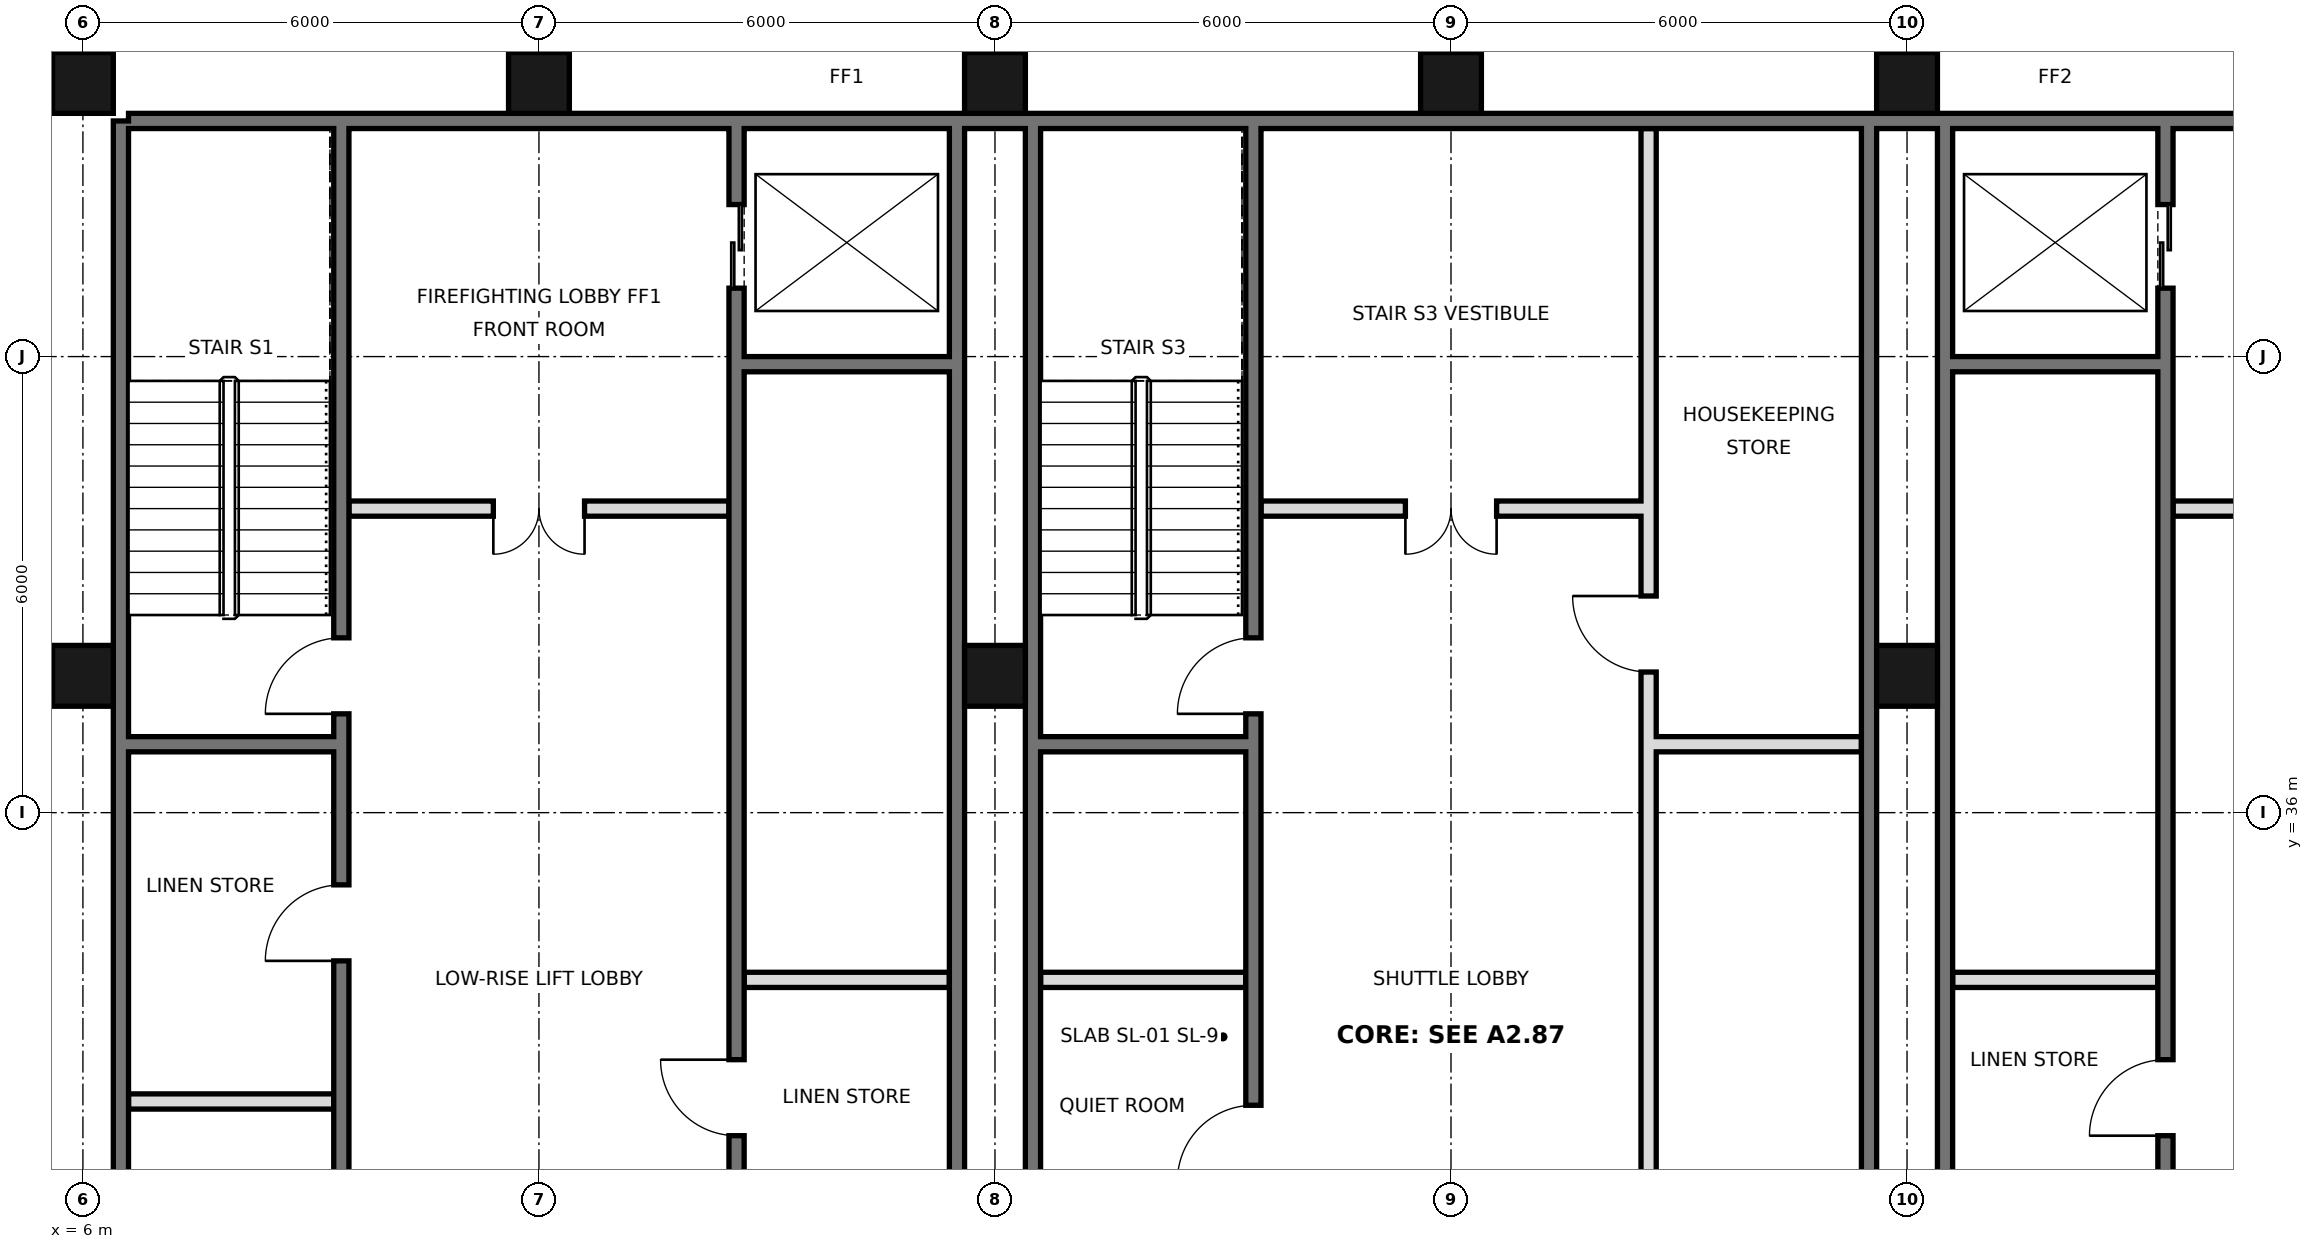
"""IFC4 building model, lengths in metres.
Left out: names, types, materials, properties, quantities, classifications, styles, units other than length and angle.
Written with IfcOpenShell. Run it as: python <this file> out.ifc"""

import sys

from ifc_helpers import new_model, si_unit, direction, frame, frame_2d, origin, origin_2d, place, context, subcontext, project, spatial, rectangle, hollow_rectangle, extrude, element, fill, save


model = new_model("IFC4")
c1 = context("Model", 3, precision=1e-05, world=origin(), true_north=direction((0.0, 1.0)))
c2 = subcontext(c1, "Body", "Model", "MODEL_VIEW")
j1 = project(units=[si_unit("LENGTHUNIT", "METRE"), si_unit("PLANEANGLEUNIT", "RADIAN")], contexts=[c1])
p1 = place(None, origin())
s1 = spatial("IfcSite", under=j1, at=p1, CompositionType="ELEMENT")
p2 = place(p1, origin())
s2 = spatial("IfcBuilding", under=s1, at=p2, CompositionType="ELEMENT")
p3 = place(p2, frame((0.0, 0.0, 349.8)))
s3 = spatial("IfcBuildingStorey", under=s2, at=p3, CompositionType="ELEMENT", Elevation=349.8)
for number, where, z_axis, x_axis in (
    (1, (6.0, 37.8, 0.0), (0.0, 0.0, 1.0), (1.0, 0.0, 0.0)),
    (2, (6.0, 45.6, 0.0), (0.0, 0.0, 1.0), (1.0, 0.0, 0.0)),
    (3, (12.0, 45.6, 0.0), (0.0, 0.0, 1.0), (1.0, 0.0, 0.0)),
    (4, (18.0, 37.8, 0.0), (0.0, 0.0, 1.0), (1.0, 0.0, 0.0)),
    (5, (18.0, 45.6, 0.0), (0.0, 0.0, 1.0), (1.0, 0.0, 0.0)),
    (6, (24.0, 45.6, 0.0), (0.0, 0.0, 1.0), (1.0, 0.0, 0.0)),
    (7, (30.0, 37.8, 0.0), (0.0, 0.0, 1.0), (1.0, 0.0, 0.0)),
    (8, (30.0, 45.6, 0.0), (0.0, 0.0, 1.0), (1.0, 0.0, 0.0)),
):
    element("IfcColumn", number, at=place(p3, frame(where, z_axis=z_axis, x_axis=x_axis)), inside=s3, PredefinedType="COLUMN", context=c2, shape_type="SweptSolid", body=[
        extrude(hollow_rectangle(XDim=0.8, YDim=0.8, WallThickness=0.025, at=origin_2d()), origin(), (0.0, 0.0, 1.0), 4.0),
    ])
p4 = place(p3, frame((6.5, 21.6, 0.0), z_axis=(0.0, 0.0, 1.0), x_axis=(0.0, 1.0, 0.0)))
e9 = element("IfcWall", 9, at=p4, inside=s3, PredefinedType="SOLIDWALL", context=c2, shape_type="SweptSolid", body=[
    extrude(rectangle(XDim=23.5, YDim=0.2, at=frame_2d((11.75, 0.0))), origin(), (0.0, 0.0, 1.0), 3.75),
])
p5 = place(p3, frame((6.6, 45.1, 0.0), z_axis=(0.0, 0.0, 1.0), x_axis=(1.0, 0.0, 0.0)))
e10 = element("IfcWall", 10, at=p5, inside=s3, PredefinedType="SOLIDWALL", context=c2, shape_type="SweptSolid", body=[
    extrude(rectangle(XDim=34.8, YDim=0.2, at=frame_2d((17.4, 0.0))), origin(), (0.0, 0.0, 1.0), 3.75),
])
for number, where, z_axis, x_axis in (
    (11, (17.5, 27.6, 0.0), (0.0, 0.0, 1.0), (0.0, 1.0, 0.0)),
    (12, (18.5, 27.6, 0.0), (0.0, 0.0, 1.0), (0.0, 1.0, 0.0)),
    (13, (29.5, 27.6, 0.0), (0.0, 0.0, 1.0), (0.0, 1.0, 0.0)),
    (14, (30.5, 27.6, 0.0), (0.0, 0.0, 1.0), (0.0, 1.0, 0.0)),
):
    element("IfcWall", number, at=place(p3, frame(where, z_axis=z_axis, x_axis=x_axis)), inside=s3, PredefinedType="SOLIDWALL", context=c2, shape_type="SweptSolid", body=[
        extrude(rectangle(XDim=17.5, YDim=0.2, at=frame_2d((8.75, 0.0))), origin(), (0.0, 0.0, 1.0), 3.75),
    ])
p6 = place(p3, frame((14.6, 27.5, 0.0), z_axis=(0.0, 0.0, 1.0), x_axis=(0.0, 1.0, 0.0)))
e15 = element("IfcWall", 15, at=p6, inside=s3, PredefinedType="SOLIDWALL", context=c2, shape_type="SweptSolid", body=[
    extrude(rectangle(XDim=17.5, YDim=0.2, at=frame_2d((8.75, 0.0))), origin(), (0.0, 0.0, 1.0), 3.75),
])
p7 = place(p6, frame((15.4, 0.0, 0.0)))
e16 = element("IfcOpeningElement", 16, at=p7, cuts=e15, PredefinedType="OPENING", context=c2, shape_type="SweptSolid", body=[
    extrude(rectangle(XDim=1.1, YDim=2.1, at=frame_2d((0.55, 1.05))), frame((0.0, 0.11, 0.0), z_axis=(0.0, -1.0, 0.0), x_axis=(1.0, 0.0, 0.0)), (0.0, 0.0, 1.0), 0.22),
])
p8 = place(p6, frame((1.15, 0.0, 0.0)))
e17 = element("IfcOpeningElement", 17, at=p8, cuts=e15, PredefinedType="OPENING", context=c2, shape_type="SweptSolid", body=[
    extrude(rectangle(XDim=1.0, YDim=2.1, at=frame_2d((0.5, 1.05))), frame((0.0, 0.11, 0.0), z_axis=(0.0, -1.0, 0.0), x_axis=(1.0, 0.0, 0.0)), (0.0, 0.0, 1.0), 0.22),
])
p9 = place(p6, frame((4.25, 0.0, 0.0)))
e18 = element("IfcOpeningElement", 18, at=p9, cuts=e15, PredefinedType="OPENING", context=c2, shape_type="SweptSolid", body=[
    extrude(rectangle(XDim=1.0, YDim=2.1, at=frame_2d((0.5, 1.05))), frame((0.0, 0.11, 0.0), z_axis=(0.0, -1.0, 0.0), x_axis=(1.0, 0.0, 0.0)), (0.0, 0.0, 1.0), 0.22),
])
p10 = place(p3, frame((21.4, 27.5, 0.0), z_axis=(0.0, 0.0, 1.0), x_axis=(0.0, 1.0, 0.0)))
e19 = element("IfcWall", 19, at=p10, inside=s3, PredefinedType="SOLIDWALL", context=c2, shape_type="SweptSolid", body=[
    extrude(rectangle(XDim=17.5, YDim=0.2, at=frame_2d((8.75, 0.0))), origin(), (0.0, 0.0, 1.0), 3.75),
])
p11 = place(p10, frame((0.55, 0.0, 0.0)))
e20 = element("IfcOpeningElement", 20, at=p11, cuts=e19, PredefinedType="OPENING", context=c2, shape_type="SweptSolid", body=[
    extrude(rectangle(XDim=1.0, YDim=2.1, at=frame_2d((0.5, 1.05))), frame((0.0, 0.11, 0.0), z_axis=(0.0, -1.0, 0.0), x_axis=(1.0, 0.0, 0.0)), (0.0, 0.0, 1.0), 0.22),
])
p12 = place(p10, frame((3.65, 0.0, 0.0)))
e21 = element("IfcOpeningElement", 21, at=p12, cuts=e19, PredefinedType="OPENING", context=c2, shape_type="SweptSolid", body=[
    extrude(rectangle(XDim=1.0, YDim=2.1, at=frame_2d((0.5, 1.05))), frame((0.0, 0.11, 0.0), z_axis=(0.0, -1.0, 0.0), x_axis=(1.0, 0.0, 0.0)), (0.0, 0.0, 1.0), 0.22),
])
p13 = place(p10, frame((9.8, 0.0, 0.0)))
e22 = element("IfcOpeningElement", 22, at=p13, cuts=e19, PredefinedType="OPENING", context=c2, shape_type="SweptSolid", body=[
    extrude(rectangle(XDim=1.0, YDim=2.1, at=frame_2d((0.5, 1.05))), frame((0.0, 0.11, 0.0), z_axis=(0.0, -1.0, 0.0), x_axis=(1.0, 0.0, 0.0)), (0.0, 0.0, 1.0), 0.22),
])
p14 = place(p3, frame((26.6, 27.6, 0.0), z_axis=(0.0, 0.0, 1.0), x_axis=(0.0, 1.0, 0.0)))
e23 = element("IfcWall", 23, at=p14, inside=s3, PredefinedType="PARTITIONING", context=c2, shape_type="SweptSolid", body=[
    extrude(rectangle(XDim=17.4, YDim=0.2, at=frame_2d((8.7, 0.0))), origin(), (0.0, 0.0, 1.0), 3.75),
])
p15 = place(p14, frame((10.25, 0.0, 0.0)))
e24 = element("IfcOpeningElement", 24, at=p15, cuts=e23, PredefinedType="OPENING", context=c2, shape_type="SweptSolid", body=[
    extrude(rectangle(XDim=1.0, YDim=2.1, at=frame_2d((0.5, 1.05))), frame((0.0, 0.11, 0.0), z_axis=(0.0, -1.0, 0.0), x_axis=(1.0, 0.0, 0.0)), (0.0, 0.0, 1.0), 0.22),
])
p16 = place(p3, frame((33.4, 27.5, 0.0), z_axis=(0.0, 0.0, 1.0), x_axis=(0.0, 1.0, 0.0)))
e25 = element("IfcWall", 25, at=p16, inside=s3, PredefinedType="SOLIDWALL", context=c2, shape_type="SweptSolid", body=[
    extrude(rectangle(XDim=17.5, YDim=0.2, at=frame_2d((8.75, 0.0))), origin(), (0.0, 0.0, 1.0), 3.75),
])
p17 = place(p16, frame((15.4, 0.0, 0.0)))
e26 = element("IfcOpeningElement", 26, at=p17, cuts=e25, PredefinedType="OPENING", context=c2, shape_type="SweptSolid", body=[
    extrude(rectangle(XDim=1.1, YDim=2.1, at=frame_2d((0.55, 1.05))), frame((0.0, 0.11, 0.0), z_axis=(0.0, -1.0, 0.0), x_axis=(1.0, 0.0, 0.0)), (0.0, 0.0, 1.0), 0.22),
])
p18 = place(p16, frame((1.15, 0.0, 0.0)))
e27 = element("IfcOpeningElement", 27, at=p18, cuts=e25, PredefinedType="OPENING", context=c2, shape_type="SweptSolid", body=[
    extrude(rectangle(XDim=1.0, YDim=2.1, at=frame_2d((0.5, 1.05))), frame((0.0, 0.11, 0.0), z_axis=(0.0, -1.0, 0.0), x_axis=(1.0, 0.0, 0.0)), (0.0, 0.0, 1.0), 0.22),
])
p19 = place(p16, frame((4.25, 0.0, 0.0)))
e28 = element("IfcOpeningElement", 28, at=p19, cuts=e25, PredefinedType="OPENING", context=c2, shape_type="SweptSolid", body=[
    extrude(rectangle(XDim=1.0, YDim=2.1, at=frame_2d((0.5, 1.05))), frame((0.0, 0.11, 0.0), z_axis=(0.0, -1.0, 0.0), x_axis=(1.0, 0.0, 0.0)), (0.0, 0.0, 1.0), 0.22),
])
p20 = place(p3, frame((9.4, 21.5, 0.0), z_axis=(0.0, 0.0, 1.0), x_axis=(0.0, 1.0, 0.0)))
e29 = element("IfcWall", 29, at=p20, inside=s3, PredefinedType="SOLIDWALL", context=c2, shape_type="SweptSolid", body=[
    extrude(rectangle(XDim=23.5, YDim=0.2, at=frame_2d((11.75, 0.0))), origin(), (0.0, 0.0, 1.0), 3.75),
])
p21 = place(p20, frame((7.9, 0.0, 0.0)))
e30 = element("IfcOpeningElement", 30, at=p21, cuts=e29, PredefinedType="OPENING", context=c2, shape_type="SweptSolid", body=[
    extrude(rectangle(XDim=1.0, YDim=2.1, at=frame_2d((0.5, 1.05))), frame((0.0, 0.11, 0.0), z_axis=(0.0, -1.0, 0.0), x_axis=(1.0, 0.0, 0.0)), (0.0, 0.0, 1.0), 0.22),
])
p22 = place(p20, frame((12.55, 0.0, 0.0)))
e31 = element("IfcOpeningElement", 31, at=p22, cuts=e29, PredefinedType="OPENING", context=c2, shape_type="SweptSolid", body=[
    extrude(rectangle(XDim=1.0, YDim=2.1, at=frame_2d((0.5, 1.05))), frame((0.0, 0.11, 0.0), z_axis=(0.0, -1.0, 0.0), x_axis=(1.0, 0.0, 0.0)), (0.0, 0.0, 1.0), 0.22),
])
p23 = place(p20, frame((15.8, 0.0, 0.0)))
e32 = element("IfcOpeningElement", 32, at=p23, cuts=e29, PredefinedType="OPENING", context=c2, shape_type="SweptSolid", body=[
    extrude(rectangle(XDim=1.0, YDim=2.1, at=frame_2d((0.5, 1.05))), frame((0.0, 0.11, 0.0), z_axis=(0.0, -1.0, 0.0), x_axis=(1.0, 0.0, 0.0)), (0.0, 0.0, 1.0), 0.22),
])
p24 = place(p20, frame((0.275, 0.0, 0.0)))
e33 = element("IfcOpeningElement", 33, at=p24, cuts=e29, PredefinedType="OPENING", context=c2, shape_type="SweptSolid", body=[
    extrude(rectangle(XDim=0.9, YDim=2.1, at=frame_2d((0.45, 1.05))), frame((0.0, 0.11, 0.0), z_axis=(0.0, -1.0, 0.0), x_axis=(1.0, 0.0, 0.0)), (0.0, 0.0, 1.0), 0.22),
])
for number, where, z_axis, x_axis in (
    (34, (6.6, 32.2, 0.0), (0.0, 0.0, 1.0), (1.0, 0.0, 0.0)),
    (35, (14.7, 33.8, 0.0), (0.0, 0.0, 1.0), (1.0, 0.0, 0.0)),
    (36, (18.6, 33.8, 0.0), (0.0, 0.0, 1.0), (1.0, 0.0, 0.0)),
    (37, (30.6, 33.8, 0.0), (0.0, 0.0, 1.0), (1.0, 0.0, 0.0)),
):
    element("IfcWall", number, at=place(p3, frame(where, z_axis=z_axis, x_axis=x_axis)), inside=s3, PredefinedType="PARTITIONING", context=c2, shape_type="SweptSolid", body=[
        extrude(rectangle(XDim=2.7, YDim=0.2, at=frame_2d((1.35, 0.0))), origin(), (0.0, 0.0, 1.0), 3.75),
    ])
p25 = place(p3, frame((18.6, 36.9, 0.0), z_axis=(0.0, 0.0, 1.0), x_axis=(1.0, 0.0, 0.0)))
e38 = element("IfcWall", 38, at=p25, inside=s3, PredefinedType="SOLIDWALL", context=c2, shape_type="SweptSolid", body=[
    extrude(rectangle(XDim=2.7, YDim=0.2, at=frame_2d((1.35, 0.0))), origin(), (0.0, 0.0, 1.0), 3.75),
])
p26 = place(p3, frame((26.7, 36.9, 0.0), z_axis=(0.0, 0.0, 1.0), x_axis=(1.0, 0.0, 0.0)))
e39 = element("IfcWall", 39, at=p26, inside=s3, PredefinedType="PARTITIONING", context=c2, shape_type="SweptSolid", body=[
    extrude(rectangle(XDim=2.7, YDim=0.2, at=frame_2d((1.35, 0.0))), origin(), (0.0, 0.0, 1.0), 3.75),
])
p27 = place(p3, frame((6.6, 36.9, 0.0), z_axis=(0.0, 0.0, 1.0), x_axis=(1.0, 0.0, 0.0)))
e40 = element("IfcWall", 40, at=p27, inside=s3, PredefinedType="SOLIDWALL", context=c2, shape_type="SweptSolid", body=[
    extrude(rectangle(XDim=2.7, YDim=0.2, at=frame_2d((1.35, 0.0))), origin(), (0.0, 0.0, 1.0), 3.75),
])
p28 = place(p3, frame((21.5, 40.0, 0.0), z_axis=(0.0, 0.0, 1.0), x_axis=(1.0, 0.0, 0.0)))
e41 = element("IfcWall", 41, at=p28, inside=s3, PredefinedType="PARTITIONING", context=c2, shape_type="SweptSolid", body=[
    extrude(rectangle(XDim=5.0, YDim=0.2, at=frame_2d((2.5, 0.0))), origin(), (0.0, 0.0, 1.0), 3.75),
])
p29 = place(p28, frame((1.9, 0.0, 0.0)))
e42 = element("IfcOpeningElement", 42, at=p29, cuts=e41, PredefinedType="OPENING", context=c2, shape_type="SweptSolid", body=[
    extrude(rectangle(XDim=1.2, YDim=2.1, at=frame_2d((0.6, 1.05))), frame((0.0, 0.11, 0.0), z_axis=(0.0, -1.0, 0.0), x_axis=(1.0, 0.0, 0.0)), (0.0, 0.0, 1.0), 0.22),
])
p30 = place(p3, frame((33.5, 40.0, 0.0), z_axis=(0.0, 0.0, 1.0), x_axis=(1.0, 0.0, 0.0)))
e43 = element("IfcWall", 43, at=p30, inside=s3, PredefinedType="PARTITIONING", context=c2, shape_type="SweptSolid", body=[
    extrude(rectangle(XDim=5.0, YDim=0.2, at=frame_2d((2.5, 0.0))), origin(), (0.0, 0.0, 1.0), 3.75),
])
p31 = place(p30, frame((1.9, 0.0, 0.0)))
e44 = element("IfcOpeningElement", 44, at=p31, cuts=e43, PredefinedType="OPENING", context=c2, shape_type="SweptSolid", body=[
    extrude(rectangle(XDim=1.2, YDim=2.1, at=frame_2d((0.6, 1.05))), frame((0.0, 0.11, 0.0), z_axis=(0.0, -1.0, 0.0), x_axis=(1.0, 0.0, 0.0)), (0.0, 0.0, 1.0), 0.22),
])
p32 = place(p3, frame((9.5, 40.0, 0.0), z_axis=(0.0, 0.0, 1.0), x_axis=(1.0, 0.0, 0.0)))
e45 = element("IfcWall", 45, at=p32, inside=s3, PredefinedType="PARTITIONING", context=c2, shape_type="SweptSolid", body=[
    extrude(rectangle(XDim=5.0, YDim=0.2, at=frame_2d((2.5, 0.0))), origin(), (0.0, 0.0, 1.0), 3.75),
])
p33 = place(p32, frame((1.9, 0.0, 0.0)))
e46 = element("IfcOpeningElement", 46, at=p33, cuts=e45, PredefinedType="OPENING", context=c2, shape_type="SweptSolid", body=[
    extrude(rectangle(XDim=1.2, YDim=2.1, at=frame_2d((0.6, 1.05))), frame((0.0, 0.11, 0.0), z_axis=(0.0, -1.0, 0.0), x_axis=(1.0, 0.0, 0.0)), (0.0, 0.0, 1.0), 0.22),
])
for number, where, z_axis, x_axis in (
    (47, (14.7, 41.9, 0.0), (0.0, 0.0, 1.0), (1.0, 0.0, 0.0)),
    (48, (30.6, 41.9, 0.0), (0.0, 0.0, 1.0), (1.0, 0.0, 0.0)),
):
    element("IfcWall", number, at=place(p3, frame(where, z_axis=z_axis, x_axis=x_axis)), inside=s3, PredefinedType="SOLIDWALL", context=c2, shape_type="SweptSolid", body=[
        extrude(rectangle(XDim=2.7, YDim=0.2, at=frame_2d((1.35, 0.0))), origin(), (0.0, 0.0, 1.0), 3.75),
    ])
p34 = place(p33, frame((1.2, 0.0, 0.0), z_axis=(0.0, 0.0, 1.0), x_axis=(-1.0, 0.0, 0.0)))
e49 = element("IfcDoor", 49, at=p34, inside=s3, OperationType="DOUBLE_DOOR_SINGLE_SWING", PredefinedType="DOOR", context=c2, shape_type="SweptSolid", body=[
    extrude(rectangle(XDim=1.2, YDim=2.1, at=frame_2d((0.6, 1.05))), frame((0.0, 0.025, 0.0), z_axis=(0.0, -1.0, 0.0), x_axis=(1.0, 0.0, 0.0)), (0.0, 0.0, 1.0), 0.05),
])
fill(e46, e49)
p35 = place(p29, frame((1.2, 0.0, 0.0), z_axis=(0.0, 0.0, 1.0), x_axis=(-1.0, 0.0, 0.0)))
e50 = element("IfcDoor", 50, at=p35, inside=s3, OperationType="DOUBLE_DOOR_SINGLE_SWING", PredefinedType="DOOR", context=c2, shape_type="SweptSolid", body=[
    extrude(rectangle(XDim=1.2, YDim=2.1, at=frame_2d((0.6, 1.05))), frame((0.0, 0.025, 0.0), z_axis=(0.0, -1.0, 0.0), x_axis=(1.0, 0.0, 0.0)), (0.0, 0.0, 1.0), 0.05),
])
fill(e42, e50)
p36 = place(p17, origin())
e51 = element("IfcDoor", 51, at=p36, inside=s3, OperationType="DOUBLE_DOOR_SLIDING", PredefinedType="DOOR", context=c2, shape_type="SweptSolid", body=[
    extrude(rectangle(XDim=1.1, YDim=2.1, at=frame_2d((0.55, 1.05))), frame((0.0, 0.025, 0.0), z_axis=(0.0, -1.0, 0.0), x_axis=(1.0, 0.0, 0.0)), (0.0, 0.0, 1.0), 0.05),
])
fill(e26, e51)
p37 = place(p7, origin())
e52 = element("IfcDoor", 52, at=p37, inside=s3, OperationType="DOUBLE_DOOR_SLIDING", PredefinedType="DOOR", context=c2, shape_type="SweptSolid", body=[
    extrude(rectangle(XDim=1.1, YDim=2.1, at=frame_2d((0.55, 1.05))), frame((0.0, 0.025, 0.0), z_axis=(0.0, -1.0, 0.0), x_axis=(1.0, 0.0, 0.0)), (0.0, 0.0, 1.0), 0.05),
])
fill(e16, e52)
p38 = place(p12, origin())
e53 = element("IfcDoor", 53, at=p38, inside=s3, OperationType="SINGLE_SWING_LEFT", PredefinedType="DOOR", context=c2, shape_type="SweptSolid", body=[
    extrude(rectangle(XDim=1.0, YDim=2.1, at=frame_2d((0.5, 1.05))), frame((0.0, 0.025, 0.0), z_axis=(0.0, -1.0, 0.0), x_axis=(1.0, 0.0, 0.0)), (0.0, 0.0, 1.0), 0.05),
])
fill(e21, e53)
p39 = place(p19, origin())
e54 = element("IfcDoor", 54, at=p39, inside=s3, OperationType="SINGLE_SWING_LEFT", PredefinedType="DOOR", context=c2, shape_type="SweptSolid", body=[
    extrude(rectangle(XDim=1.0, YDim=2.1, at=frame_2d((0.5, 1.05))), frame((0.0, 0.025, 0.0), z_axis=(0.0, -1.0, 0.0), x_axis=(1.0, 0.0, 0.0)), (0.0, 0.0, 1.0), 0.05),
])
fill(e28, e54)
p40 = place(p9, frame((1.0, 0.0, 0.0), z_axis=(0.0, 0.0, 1.0), x_axis=(-1.0, 0.0, 0.0)))
e55 = element("IfcDoor", 55, at=p40, inside=s3, OperationType="SINGLE_SWING_LEFT", PredefinedType="DOOR", context=c2, shape_type="SweptSolid", body=[
    extrude(rectangle(XDim=1.0, YDim=2.1, at=frame_2d((0.5, 1.05))), frame((0.0, 0.025, 0.0), z_axis=(0.0, -1.0, 0.0), x_axis=(1.0, 0.0, 0.0)), (0.0, 0.0, 1.0), 0.05),
])
fill(e18, e55)
p41 = place(p22, origin())
e56 = element("IfcDoor", 56, at=p41, inside=s3, OperationType="SINGLE_SWING_LEFT", PredefinedType="DOOR", context=c2, shape_type="SweptSolid", body=[
    extrude(rectangle(XDim=1.0, YDim=2.1, at=frame_2d((0.5, 1.05))), frame((0.0, 0.025, 0.0), z_axis=(0.0, -1.0, 0.0), x_axis=(1.0, 0.0, 0.0)), (0.0, 0.0, 1.0), 0.05),
])
fill(e31, e56)
p42 = place(p23, origin())
e57 = element("IfcDoor", 57, at=p42, inside=s3, OperationType="SINGLE_SWING_LEFT", PredefinedType="DOOR", context=c2, shape_type="SweptSolid", body=[
    extrude(rectangle(XDim=1.0, YDim=2.1, at=frame_2d((0.5, 1.05))), frame((0.0, 0.025, 0.0), z_axis=(0.0, -1.0, 0.0), x_axis=(1.0, 0.0, 0.0)), (0.0, 0.0, 1.0), 0.05),
])
fill(e32, e57)
p43 = place(p13, origin())
e58 = element("IfcDoor", 58, at=p43, inside=s3, OperationType="SINGLE_SWING_LEFT", PredefinedType="DOOR", context=c2, shape_type="SweptSolid", body=[
    extrude(rectangle(XDim=1.0, YDim=2.1, at=frame_2d((0.5, 1.05))), frame((0.0, 0.025, 0.0), z_axis=(0.0, -1.0, 0.0), x_axis=(1.0, 0.0, 0.0)), (0.0, 0.0, 1.0), 0.05),
])
fill(e22, e58)
p44 = place(p15, frame((1.0, 0.0, 0.0), z_axis=(0.0, 0.0, 1.0), x_axis=(-1.0, 0.0, 0.0)))
e59 = element("IfcDoor", 59, at=p44, inside=s3, OperationType="SINGLE_SWING_LEFT", PredefinedType="DOOR", context=c2, shape_type="SweptSolid", body=[
    extrude(rectangle(XDim=1.0, YDim=2.1, at=frame_2d((0.5, 1.05))), frame((0.0, 0.025, 0.0), z_axis=(0.0, -1.0, 0.0), x_axis=(1.0, 0.0, 0.0)), (0.0, 0.0, 1.0), 0.05),
])
fill(e24, e59)
save(model, sys.argv[1])
